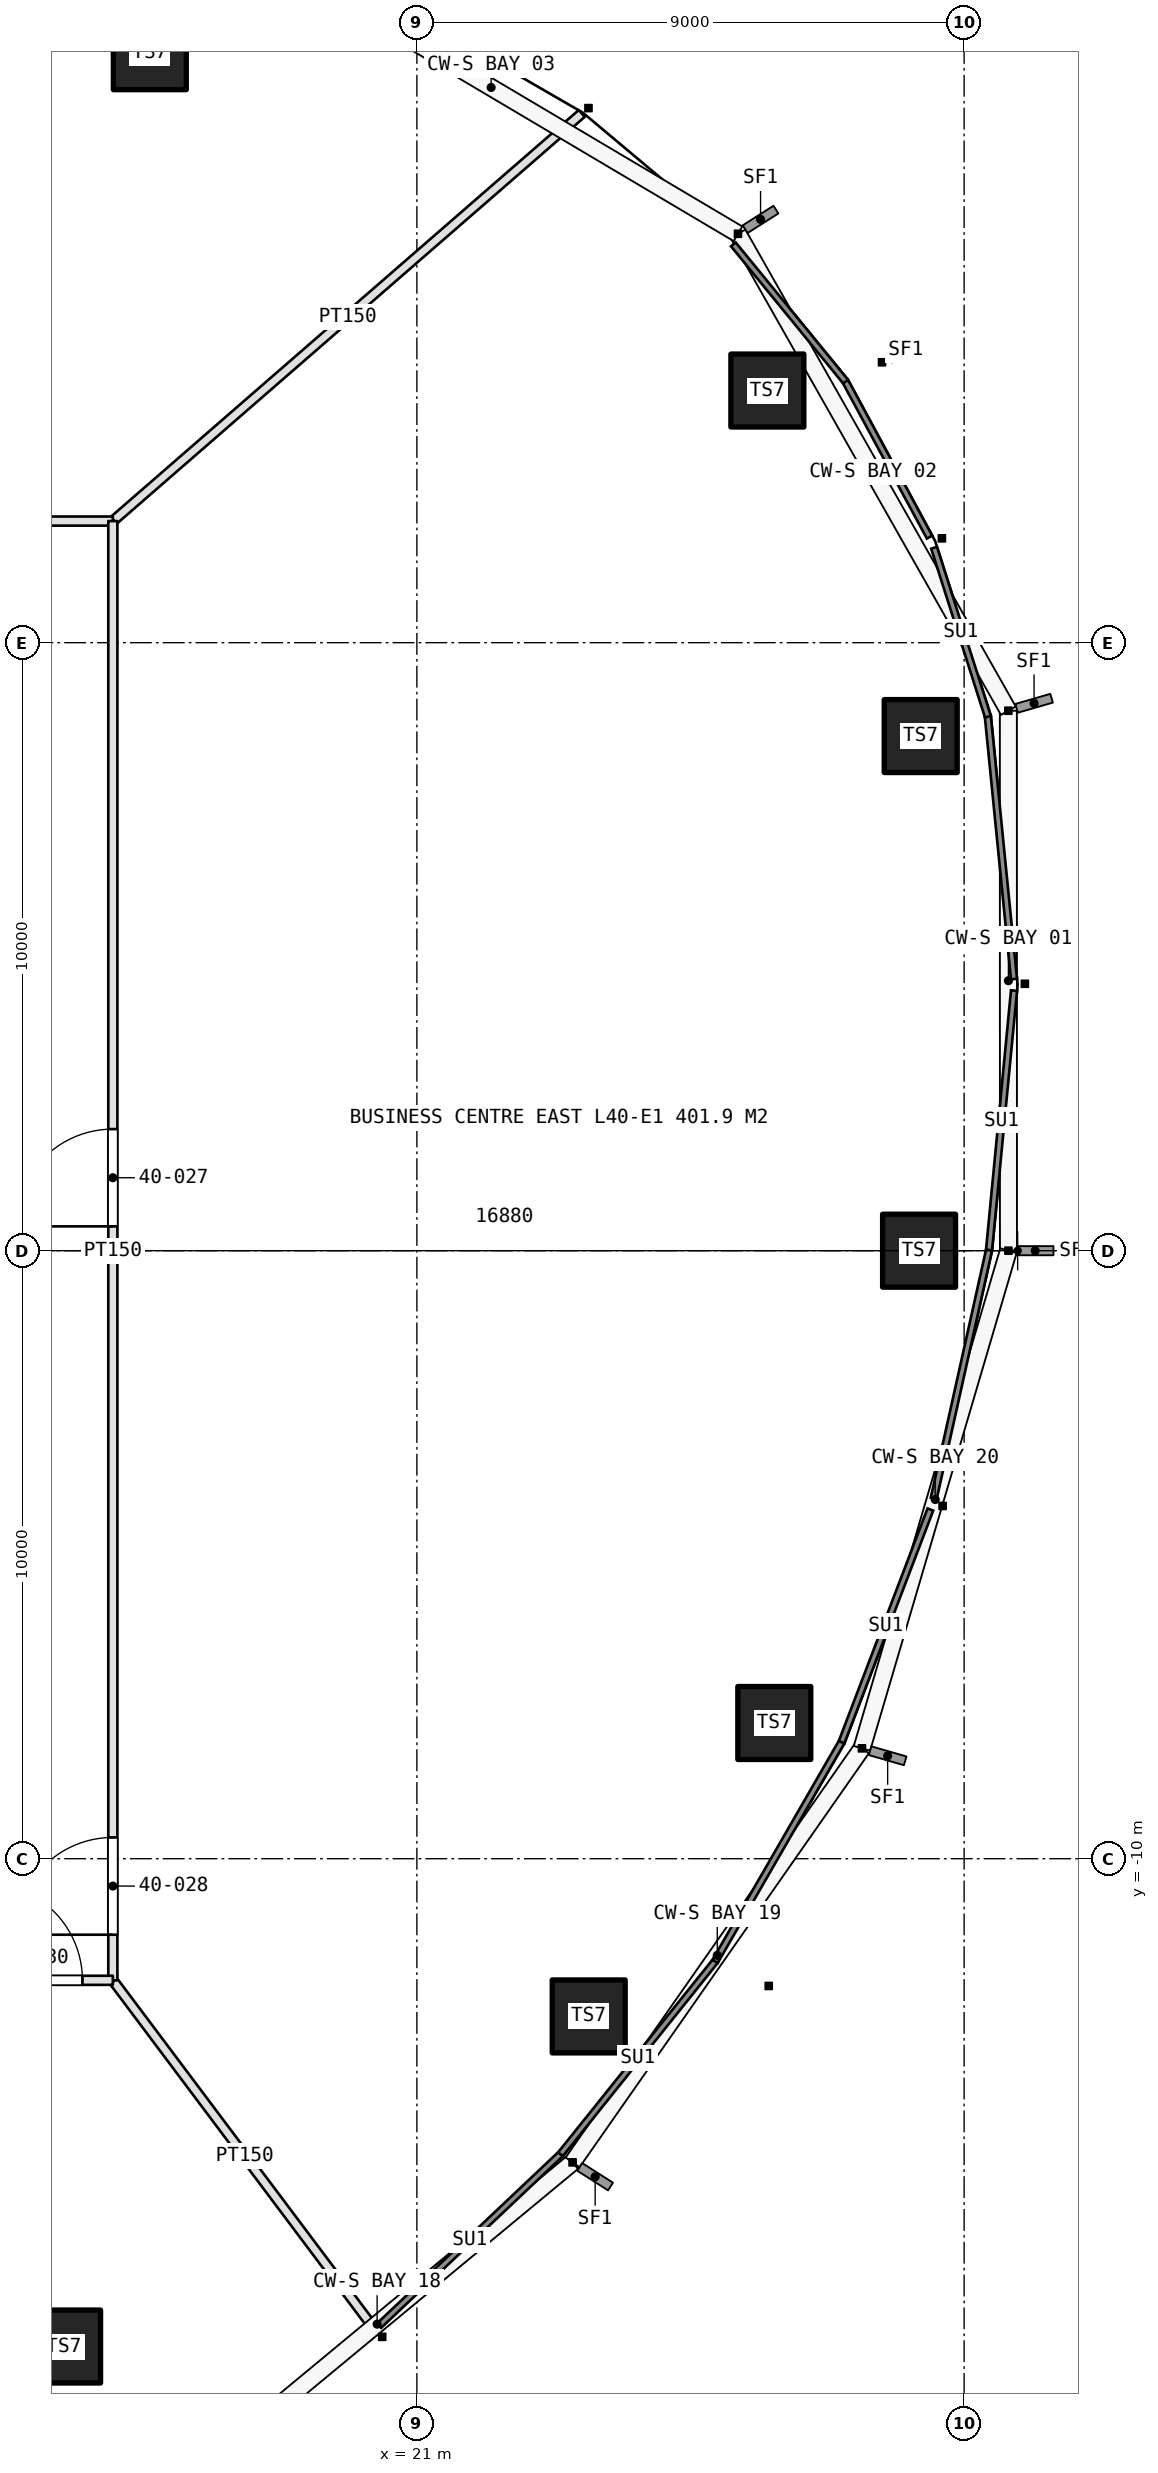
"""IFC4 building model, lengths in metres.
Left out: names, types, materials, properties, quantities, classifications, styles, units other than length and angle.
Written with IfcOpenShell. Run it as: python <this file> out.ifc"""

import sys

from ifc_helpers import new_model, si_unit, direction, frame, frame_2d, origin, origin_2d, place, context, subcontext, project, spatial, rectangle, hollow_rectangle, extrude, element, fill, save


model = new_model("IFC4")
c1 = context("Model", 3, precision=1e-05, world=origin(), true_north=direction((0.0, 1.0)))
c2 = subcontext(c1, "Body", "Model", "MODEL_VIEW")
j1 = project(units=[si_unit("LENGTHUNIT", "METRE"), si_unit("PLANEANGLEUNIT", "RADIAN")], contexts=[c1])
p1 = place(None, origin())
s1 = spatial("IfcSite", under=j1, at=p1, CompositionType="ELEMENT")
p2 = place(p1, origin())
s2 = spatial("IfcBuilding", under=s1, at=p2, CompositionType="ELEMENT")
p3 = place(p2, frame((0.0, 0.0, 184.8)))
s3 = spatial("IfcBuildingStorey", under=s2, at=p3, CompositionType="ELEMENT", Elevation=184.8)
for number, where, z_axis, x_axis in (
    (1, (29.259, 0.0, 0.0), (0.0, 0.0, 1.0), (1.0, 0.0, 0.0)),
    (2, (29.286, 8.464, 0.0), (0.0, 0.0, 1.0), (1.0, 0.0, 0.0)),
    (3, (26.764, 14.147, 0.0), (0.0, 0.0, 1.0), (1.0, 0.0, 0.0)),
):
    element("IfcColumn", number, at=place(p3, frame(where, z_axis=z_axis, x_axis=x_axis)), inside=s3, PredefinedType="COLUMN", context=c2, shape_type="SweptSolid", body=[
        extrude(hollow_rectangle(XDim=1.2, YDim=1.2, WallThickness=0.12, at=origin_2d()), origin(), (0.0, 0.0, 1.0), 4.225),
    ])
for number, where, z_axis, x_axis in (
    (4, (16.608, 19.695, 0.0), (0.0, 0.0, 1.0), (1.0, 0.0, 0.0)),
    (5, (15.198, -18.023, 0.0), (0.0, 0.0, 1.0), (1.0, 0.0, 0.0)),
):
    element("IfcColumn", number, at=place(p3, frame(where, z_axis=z_axis, x_axis=x_axis)), inside=s3, PredefinedType="COLUMN", context=c2, shape_type="SweptSolid", body=[
        extrude(hollow_rectangle(XDim=1.2, YDim=1.2, WallThickness=0.12, at=origin_2d()), origin(), (0.0, 0.0, 1.0), 5.0),
    ])
for number, where, z_axis, x_axis in (
    (6, (23.826, -12.594, 0.0), (0.0, 0.0, 1.0), (1.0, 0.0, 0.0)),
    (7, (26.878, -7.768, 0.0), (0.0, 0.0, 1.0), (1.0, 0.0, 0.0)),
):
    element("IfcColumn", number, at=place(p3, frame(where, z_axis=z_axis, x_axis=x_axis)), inside=s3, PredefinedType="COLUMN", context=c2, shape_type="SweptSolid", body=[
        extrude(hollow_rectangle(XDim=1.2, YDim=1.2, WallThickness=0.12, at=origin_2d()), origin(), (0.0, 0.0, 1.0), 4.225),
    ])
p4 = place(p3, frame((16.012, -12.016, 0.0), z_axis=(0.0, 0.0, 1.0), x_axis=(0.600059749679, -0.799955184254, 0.0)))
e8 = element("IfcWall", 8, at=p4, inside=s3, PredefinedType="PARTITIONING", context=c2, shape_type="SweptSolid", body=[
    extrude(rectangle(XDim=7.191, YDim=0.15, at=frame_2d((3.596, 0.0))), origin(), (0.0, 0.0, 1.0), 3.6),
])
p5 = place(p3, frame((16.015, 12.013, 0.0), z_axis=(0.0, 0.0, 1.0), x_axis=(0.754689007548, 0.656082694397, 0.0)))
e9 = element("IfcWall", 9, at=p5, inside=s3, PredefinedType="PARTITIONING", context=c2, shape_type="SweptSolid", body=[
    extrude(rectangle(XDim=10.198, YDim=0.15, at=frame_2d((5.099, 0.0))), origin(), (0.0, 0.0, 1.0), 3.6),
])
p6 = place(p3, frame((16.0, 12.0, 0.0), z_axis=(0.0, 0.0, 1.0), x_axis=(-1.0, 0.0, 0.0)))
e10 = element("IfcWall", 10, at=p6, inside=s3, PredefinedType="PARTITIONING", context=c2, shape_type="SweptSolid", body=[
    extrude(rectangle(XDim=10.0, YDim=0.15, at=frame_2d((5.0, 0.0))), origin(), (0.0, 0.0, 1.0), 3.6),
])
p7 = place(p6, frame((7.9, 0.0, 0.0)))
e11 = element("IfcOpeningElement", 11, at=p7, cuts=e10, PredefinedType="OPENING", context=c2, shape_type="SweptSolid", body=[
    extrude(rectangle(XDim=1.6, YDim=2.4, at=frame_2d((0.8, 1.2))), frame((0.0, 0.085, 0.0), z_axis=(0.0, -1.0, 0.0), x_axis=(1.0, 0.0, 0.0)), (0.0, 0.0, 1.0), 0.17),
])
p8 = place(p3, frame((16.0, -12.0, 0.0), z_axis=(0.0, 0.0, 1.0), x_axis=(0.0, 1.0, 0.0)))
e12 = element("IfcWall", 12, at=p8, inside=s3, PredefinedType="PARTITIONING", context=c2, shape_type="SweptSolid", body=[
    extrude(rectangle(XDim=24.0, YDim=0.15, at=frame_2d((12.0, 0.0))), origin(), (0.0, 0.0, 1.0), 3.6),
])
p9 = place(p8, frame((12.4, 0.0, 0.0)))
e13 = element("IfcOpeningElement", 13, at=p9, cuts=e12, PredefinedType="OPENING", context=c2, shape_type="SweptSolid", body=[
    extrude(rectangle(XDim=1.6, YDim=2.4, at=frame_2d((0.8, 1.2))), frame((0.0, 0.085, 0.0), z_axis=(0.0, -1.0, 0.0), x_axis=(1.0, 0.0, 0.0)), (0.0, 0.0, 1.0), 0.17),
])
p10 = place(p8, frame((0.75, 0.0, 0.0)))
e14 = element("IfcOpeningElement", 14, at=p10, cuts=e12, PredefinedType="OPENING", context=c2, shape_type="SweptSolid", body=[
    extrude(rectangle(XDim=1.6, YDim=2.4, at=frame_2d((0.8, 1.2))), frame((0.0, 0.085, 0.0), z_axis=(0.0, -1.0, 0.0), x_axis=(1.0, 0.0, 0.0)), (0.0, 0.0, 1.0), 0.17),
])
p11 = place(p3, frame((-2.0, -12.0, 0.0), z_axis=(0.0, 0.0, 1.0), x_axis=(1.0, 0.0, 0.0)))
e15 = element("IfcWall", 15, at=p11, inside=s3, PredefinedType="PARTITIONING", context=c2, shape_type="SweptSolid", body=[
    extrude(rectangle(XDim=18.0, YDim=0.15, at=frame_2d((9.0, 0.0))), origin(), (0.0, 0.0, 1.0), 3.6),
])
p12 = place(p11, frame((0.65, 0.0, 0.0)))
e16 = element("IfcOpeningElement", 16, at=p12, cuts=e15, PredefinedType="OPENING", context=c2, shape_type="SweptSolid", body=[
    extrude(rectangle(XDim=1.6, YDim=2.4, at=frame_2d((0.8, 1.2))), frame((0.0, 0.085, 0.0), z_axis=(0.0, -1.0, 0.0), x_axis=(1.0, 0.0, 0.0)), (0.0, 0.0, 1.0), 0.17),
])
p13 = place(p11, frame((15.9, 0.0, 0.0)))
e17 = element("IfcOpeningElement", 17, at=p13, cuts=e15, PredefinedType="OPENING", context=c2, shape_type="SweptSolid", body=[
    extrude(rectangle(XDim=1.6, YDim=2.4, at=frame_2d((0.8, 1.2))), frame((0.0, 0.085, 0.0), z_axis=(0.0, -1.0, 0.0), x_axis=(1.0, 0.0, 0.0)), (0.0, 0.0, 1.0), 0.17),
])
p14 = place(p9, origin())
e18 = element("IfcDoor", 18, at=p14, inside=s3, OperationType="DOUBLE_DOOR_SINGLE_SWING", PredefinedType="DOOR", context=c2, shape_type="SweptSolid", body=[
    extrude(rectangle(XDim=1.6, YDim=2.4, at=frame_2d((0.8, 1.2))), frame((0.0, 0.025, 0.0), z_axis=(0.0, -1.0, 0.0), x_axis=(1.0, 0.0, 0.0)), (0.0, 0.0, 1.0), 0.05),
])
fill(e13, e18)
p15 = place(p10, origin())
e19 = element("IfcDoor", 19, at=p15, inside=s3, OperationType="DOUBLE_DOOR_SINGLE_SWING", PredefinedType="DOOR", context=c2, shape_type="SweptSolid", body=[
    extrude(rectangle(XDim=1.6, YDim=2.4, at=frame_2d((0.8, 1.2))), frame((0.0, 0.025, 0.0), z_axis=(0.0, -1.0, 0.0), x_axis=(1.0, 0.0, 0.0)), (0.0, 0.0, 1.0), 0.05),
])
fill(e14, e19)
p16 = place(p13, origin())
e20 = element("IfcDoor", 20, at=p16, inside=s3, OperationType="DOUBLE_DOOR_SINGLE_SWING", PredefinedType="DOOR", context=c2, shape_type="SweptSolid", body=[
    extrude(rectangle(XDim=1.6, YDim=2.4, at=frame_2d((0.8, 1.2))), frame((0.0, 0.025, 0.0), z_axis=(0.0, -1.0, 0.0), x_axis=(1.0, 0.0, 0.0)), (0.0, 0.0, 1.0), 0.05),
])
fill(e17, e20)
save(model, sys.argv[1])
